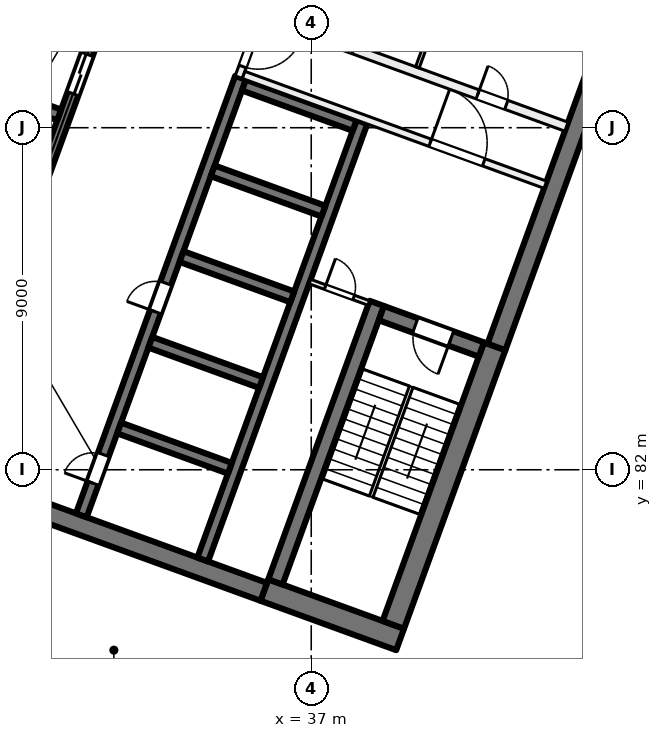
"""IFC4 building model, lengths in metres.
Left out: names, types, materials, properties, quantities, classifications, styles, units other than length and angle.
Written with IfcOpenShell. Run it as: python <this file> out.ifc"""

import sys

from ifc_helpers import new_model, si_unit, direction, frame, frame_2d, origin, place, context, subcontext, project, spatial, rectangle, extrude, element, fill, save


model = new_model("IFC4")
c1 = context("Model", 3, precision=1e-05, world=origin(), true_north=direction((0.0, 1.0)))
c2 = subcontext(c1, "Body", "Model", "MODEL_VIEW")
j1 = project(units=[si_unit("LENGTHUNIT", "METRE"), si_unit("PLANEANGLEUNIT", "RADIAN")], contexts=[c1])
p1 = place(None, origin())
s1 = spatial("IfcSite", under=j1, at=p1, CompositionType="ELEMENT")
p2 = place(p1, origin())
s2 = spatial("IfcBuilding", under=s1, at=p2, CompositionType="ELEMENT")
p3 = place(p2, frame((0.0, 0.0, 232.0)))
s3 = spatial("IfcBuildingStorey", under=s2, at=p3, CompositionType="ELEMENT", Elevation=232.0)
p4 = place(p3, frame((39.338, 77.535, 0.0), z_axis=(0.0, 0.0, 1.0), x_axis=(-0.939701471648, 0.341995824804, 0.0)))
e1 = element("IfcWall", 1, at=p4, inside=s3, PredefinedType="SHEAR", context=c2, shape_type="SweptSolid", body=[
    extrude(rectangle(XDim=3.8, YDim=0.6, at=frame_2d((1.9, 0.0))), origin(), (0.0, 0.0, 1.0), 4.0),
])
p5 = place(p3, frame((35.75, 78.788, 0.0), z_axis=(0.0, 0.0, 1.0), x_axis=(-0.939692894512, 0.342019391267, 0.0)))
e2 = element("IfcWall", 2, at=p5, inside=s3, PredefinedType="SHEAR", context=c2, shape_type="SweptSolid", body=[
    extrude(rectangle(XDim=14.4, YDim=0.5, at=frame_2d((7.2, 0.0))), origin(), (0.0, 0.0, 1.0), 4.0),
])
p6 = place(p3, frame((39.159, 77.92, 0.0), z_axis=(0.0, 0.0, 1.0), x_axis=(0.342016982193, 0.939693771338, 0.0)))
e3 = element("IfcWall", 3, at=p6, inside=s3, PredefinedType="SHEAR", context=c2, shape_type="SweptSolid", body=[
    extrude(rectangle(XDim=7.8, YDim=0.6, at=frame_2d((3.9, 0.0))), origin(), (0.0, 0.0, 1.0), 4.0),
])
p7 = place(p3, frame((41.874, 85.232, 0.0), z_axis=(0.0, 0.0, 1.0), x_axis=(0.342020437038, 0.939692513883, 0.0)))
e4 = element("IfcWall", 4, at=p7, inside=s3, PredefinedType="SHEAR", context=c2, shape_type="SweptSolid", body=[
    extrude(rectangle(XDim=8.975, YDim=0.5, at=frame_2d((4.487, 0.0))), origin(), (0.0, 0.0, 1.0), 4.0),
])
p8 = place(p3, frame((36.058, 79.048, 0.0), z_axis=(0.0, 0.0, 1.0), x_axis=(0.342016982193, 0.939693771338, 0.0)))
e5 = element("IfcWall", 5, at=p8, inside=s3, PredefinedType="SHEAR", context=c2, shape_type="SweptSolid", body=[
    extrude(rectangle(XDim=7.8, YDim=0.4, at=frame_2d((3.9, 0.0))), origin(), (0.0, 0.0, 1.0), 4.0),
])
p9 = place(p3, frame((41.476, 85.164, 0.0), z_axis=(0.0, 0.0, 1.0), x_axis=(-0.939678810556, 0.342058084236, 0.0)))
e6 = element("IfcWall", 6, at=p9, inside=s3, PredefinedType="SHEAR", context=c2, shape_type="SweptSolid", body=[
    extrude(rectangle(XDim=2.8, YDim=0.4, at=frame_2d((1.4, 0.0))), origin(), (0.0, 0.0, 1.0), 4.0),
])
p10 = place(p9, frame((0.85, 0.0, 0.0)))
e7 = element("IfcOpeningElement", 7, at=p10, cuts=e6, PredefinedType="OPENING", context=c2, shape_type="SweptSolid", body=[
    extrude(rectangle(XDim=1.0, YDim=2.1, at=frame_2d((0.5, 1.05))), frame((0.0, 0.21, 0.0), z_axis=(0.0, -1.0, 0.0), x_axis=(1.0, 0.0, 0.0)), (0.0, 0.0, 1.0), 0.42),
])
p11 = place(p3, frame((30.949, 80.801, 0.0), z_axis=(0.0, 0.0, 1.0), x_axis=(0.342016684409, 0.939693879721, 0.0)))
e8 = element("IfcWall", 8, at=p11, inside=s3, PredefinedType="SHEAR", context=c2, shape_type="SweptSolid", body=[
    extrude(rectangle(XDim=12.25, YDim=0.3, at=frame_2d((6.125, 0.0))), origin(), (0.0, 0.0, 1.0), 4.0),
])
p12 = place(p11, frame((0.9, 0.0, 0.0)))
e9 = element("IfcOpeningElement", 9, at=p12, cuts=e8, PredefinedType="OPENING", context=c2, shape_type="SweptSolid", body=[
    extrude(rectangle(XDim=0.8, YDim=2.1, at=frame_2d((0.4, 1.05))), frame((0.0, 0.16, 0.0), z_axis=(0.0, -1.0, 0.0), x_axis=(1.0, 0.0, 0.0)), (0.0, 0.0, 1.0), 0.32),
])
p13 = place(p11, frame((5.7, 0.0, 0.0)))
e10 = element("IfcOpeningElement", 10, at=p13, cuts=e8, PredefinedType="OPENING", context=c2, shape_type="SweptSolid", body=[
    extrude(rectangle(XDim=0.8, YDim=2.1, at=frame_2d((0.4, 1.05))), frame((0.0, 0.16, 0.0), z_axis=(0.0, -1.0, 0.0), x_axis=(1.0, 0.0, 0.0)), (0.0, 0.0, 1.0), 0.32),
])
p14 = place(p3, frame((34.144, 79.638, 0.0), z_axis=(0.0, 0.0, 1.0), x_axis=(0.342016684409, 0.939693879721, 0.0)))
e11 = element("IfcWall", 11, at=p14, inside=s3, PredefinedType="SHEAR", context=c2, shape_type="SweptSolid", body=[
    extrude(rectangle(XDim=12.25, YDim=0.3, at=frame_2d((6.125, 0.0))), origin(), (0.0, 0.0, 1.0), 4.0),
])
p15 = place(p3, frame((34.858, 82.039, 0.0), z_axis=(0.0, 0.0, 1.0), x_axis=(-0.939689908313, 0.342027595692, 0.0)))
e12 = element("IfcWall", 12, at=p15, inside=s3, PredefinedType="SHEAR", context=c2, shape_type="SweptSolid", body=[
    extrude(rectangle(XDim=3.1, YDim=0.3, at=frame_2d((1.55, 0.0))), origin(), (0.0, 0.0, 1.0), 4.0),
])
p16 = place(p3, frame((35.679, 84.294, 0.0), z_axis=(0.0, 0.0, 1.0), x_axis=(-0.939706007505, 0.341983361377, 0.0)))
e13 = element("IfcWall", 13, at=p16, inside=s3, PredefinedType="SHEAR", context=c2, shape_type="SweptSolid", body=[
    extrude(rectangle(XDim=3.1, YDim=0.3, at=frame_2d((1.55, 0.0))), origin(), (0.0, 0.0, 1.0), 4.0),
])
for number, where, z_axis, x_axis in (
    (14, (36.5, 86.549, 0.0), (0.0, 0.0, 1.0), (-0.94, 0.342, 0.0)),
    (15, (37.321, 88.805, 0.0), (0.0, 0.0, 1.0), (-0.94, 0.342, 0.0)),
    (16, (38.142, 91.06, 0.0), (0.0, 0.0, 1.0), (-0.94, 0.342, 0.0)),
):
    element("IfcWall", number, at=place(p3, frame(where, z_axis=z_axis, x_axis=x_axis)), inside=s3, PredefinedType="SHEAR", context=c2, shape_type="SweptSolid", body=[
        extrude(rectangle(XDim=3.1, YDim=0.3, at=frame_2d((1.55, 0.0))), origin(), (0.0, 0.0, 1.0), 4.0),
    ])
p17 = place(p3, frame((27.191, 82.169, 0.0), z_axis=(0.0, 0.0, 1.0), x_axis=(0.342016684409, 0.939693879721, 0.0)))
e17 = element("IfcWall", 17, at=p17, inside=s3, PredefinedType="SHEAR", context=c2, shape_type="SweptSolid", body=[
    extrude(rectangle(XDim=12.25, YDim=0.3, at=frame_2d((6.125, 0.0))), origin(), (0.0, 0.0, 1.0), 4.0),
])
p18 = place(p17, frame((0.75, 0.0, 0.0)))
e18 = element("IfcOpeningElement", 18, at=p18, cuts=e17, PredefinedType="OPENING", context=c2, shape_type="SweptSolid", body=[
    extrude(rectangle(XDim=1.1, YDim=2.1, at=frame_2d((0.55, 1.05))), frame((0.0, 0.16, 0.0), z_axis=(0.0, -1.0, 0.0), x_axis=(1.0, 0.0, 0.0)), (0.0, 0.0, 1.0), 0.32),
])
p19 = place(p17, frame((3.15, 0.0, 0.0)))
e19 = element("IfcOpeningElement", 19, at=p19, cuts=e17, PredefinedType="OPENING", context=c2, shape_type="SweptSolid", body=[
    extrude(rectangle(XDim=1.1, YDim=2.1, at=frame_2d((0.55, 1.05))), frame((0.0, 0.16, 0.0), z_axis=(0.0, -1.0, 0.0), x_axis=(1.0, 0.0, 0.0)), (0.0, 0.0, 1.0), 0.32),
])
p20 = place(p17, frame((5.55, 0.0, 0.0)))
e20 = element("IfcOpeningElement", 20, at=p20, cuts=e17, PredefinedType="OPENING", context=c2, shape_type="SweptSolid", body=[
    extrude(rectangle(XDim=1.1, YDim=2.1, at=frame_2d((0.55, 1.05))), frame((0.0, 0.16, 0.0), z_axis=(0.0, -1.0, 0.0), x_axis=(1.0, 0.0, 0.0)), (0.0, 0.0, 1.0), 0.32),
])
p21 = place(p17, frame((10.35, 0.0, 0.0)))
e21 = element("IfcOpeningElement", 21, at=p21, cuts=e17, PredefinedType="OPENING", context=c2, shape_type="SweptSolid", body=[
    extrude(rectangle(XDim=1.1, YDim=2.1, at=frame_2d((0.55, 1.05))), frame((0.0, 0.16, 0.0), z_axis=(0.0, -1.0, 0.0), x_axis=(1.0, 0.0, 0.0)), (0.0, 0.0, 1.0), 0.32),
])
p22 = place(p3, frame((30.367, 91.336, 0.0), z_axis=(0.0, 0.0, 1.0), x_axis=(-0.939715217871, 0.341958051961, 0.0)))
e22 = element("IfcWall", 22, at=p22, inside=s3, PredefinedType="SHEAR", context=c2, shape_type="SweptSolid", body=[
    extrude(rectangle(XDim=3.1, YDim=0.3, at=frame_2d((1.55, 0.0))), origin(), (0.0, 0.0, 1.0), 4.0),
])
p23 = place(p3, frame((36.443, 96.041, 0.0), z_axis=(0.0, 0.0, 1.0), x_axis=(-0.341996156931, -0.939701350773, 0.0)))
e23 = element("IfcWall", 23, at=p23, inside=s3, PredefinedType="PARTITIONING", context=c2, shape_type="SweptSolid", body=[
    extrude(rectangle(XDim=3.95, YDim=0.2, at=frame_2d((1.975, 0.0))), origin(), (0.0, 0.0, 1.0), 3.625),
])
p24 = place(p23, frame((2.45, 0.0, 0.0)))
e24 = element("IfcOpeningElement", 24, at=p24, cuts=e23, PredefinedType="OPENING", context=c2, shape_type="SweptSolid", body=[
    extrude(rectangle(XDim=1.2, YDim=2.1, at=frame_2d((0.6, 1.05))), frame((0.0, 0.11, 0.0), z_axis=(0.0, -1.0, 0.0), x_axis=(1.0, 0.0, 0.0)), (0.0, 0.0, 1.0), 0.22),
])
p25 = place(p3, frame((35.22, 92.389, 0.0), z_axis=(0.0, 0.0, 1.0), x_axis=(0.939690465531, -0.342026064782, 0.0)))
e25 = element("IfcWall", 25, at=p25, inside=s3, PredefinedType="PARTITIONING", context=c2, shape_type="SweptSolid", body=[
    extrude(rectangle(XDim=8.45, YDim=0.2, at=frame_2d((4.225, 0.0))), origin(), (0.0, 0.0, 1.0), 3.625),
])
p26 = place(p25, frame((5.225, 0.0, 0.0)))
e26 = element("IfcOpeningElement", 26, at=p26, cuts=e25, PredefinedType="OPENING", context=c2, shape_type="SweptSolid", body=[
    extrude(rectangle(XDim=1.5, YDim=2.1, at=frame_2d((0.75, 1.05))), frame((0.0, 0.11, 0.0), z_axis=(0.0, -1.0, 0.0), x_axis=(1.0, 0.0, 0.0)), (0.0, 0.0, 1.0), 0.22),
])
p27 = place(p3, frame((35.776, 93.916, 0.0), z_axis=(0.0, 0.0, 1.0), x_axis=(0.939690465531, -0.342026064782, 0.0)))
e27 = element("IfcWall", 27, at=p27, inside=s3, PredefinedType="PARTITIONING", context=c2, shape_type="SweptSolid", body=[
    extrude(rectangle(XDim=8.45, YDim=0.25, at=frame_2d((4.225, 0.0))), origin(), (0.0, 0.0, 1.0), 3.625),
])
p28 = place(p27, frame((1.69, 0.0, 0.0)))
e28 = element("IfcOpeningElement", 28, at=p28, cuts=e27, PredefinedType="OPENING", context=c2, shape_type="SweptSolid", body=[
    extrude(rectangle(XDim=0.8, YDim=2.1, at=frame_2d((0.4, 1.05))), frame((0.0, 0.135, 0.0), z_axis=(0.0, -1.0, 0.0), x_axis=(1.0, 0.0, 0.0)), (0.0, 0.0, 1.0), 0.27),
])
p29 = place(p27, frame((5.965, 0.0, 0.0)))
e29 = element("IfcOpeningElement", 29, at=p29, cuts=e27, PredefinedType="OPENING", context=c2, shape_type="SweptSolid", body=[
    extrude(rectangle(XDim=0.8, YDim=2.1, at=frame_2d((0.4, 1.05))), frame((0.0, 0.135, 0.0), z_axis=(0.0, -1.0, 0.0), x_axis=(1.0, 0.0, 0.0)), (0.0, 0.0, 1.0), 0.27),
])
p30 = place(p3, frame((36.966, 86.952, 0.0), z_axis=(0.0, 0.0, 1.0), x_axis=(0.939672407396, -0.342075674051, 0.0)))
e30 = element("IfcWall", 30, at=p30, inside=s3, PredefinedType="PARTITIONING", context=c2, shape_type="SweptSolid", body=[
    extrude(rectangle(XDim=1.65, YDim=0.125, at=frame_2d((0.825, 0.0))), origin(), (0.0, 0.0, 1.0), 3.625),
])
p31 = place(p30, frame((0.425, 0.0, 0.0)))
e31 = element("IfcOpeningElement", 31, at=p31, cuts=e30, PredefinedType="OPENING", context=c2, shape_type="SweptSolid", body=[
    extrude(rectangle(XDim=0.8, YDim=2.1, at=frame_2d((0.4, 1.05))), frame((0.0, 0.073, 0.0), z_axis=(0.0, -1.0, 0.0), x_axis=(1.0, 0.0, 0.0)), (0.0, 0.0, 1.0), 0.145),
])
p32 = place(p3, frame((40.512, 94.56, 0.0), z_axis=(0.0, 0.0, 1.0), x_axis=(-0.342023078919, -0.939691552312, 0.0)))
e32 = element("IfcWall", 32, at=p32, inside=s3, PredefinedType="PARTITIONING", context=c2, shape_type="SweptSolid", body=[
    extrude(rectangle(XDim=2.1, YDim=0.1, at=frame_2d((1.05, 0.0))), origin(), (0.0, 0.0, 1.0), 3.625),
])
p33 = place(p21, origin())
e33 = element("IfcDoor", 33, at=p33, inside=s3, OperationType="DOUBLE_DOOR_SLIDING", PredefinedType="DOOR", context=c2, shape_type="SweptSolid", body=[
    extrude(rectangle(XDim=1.1, YDim=2.1, at=frame_2d((0.55, 1.05))), frame((0.0, 0.025, 0.0), z_axis=(0.0, -1.0, 0.0), x_axis=(1.0, 0.0, 0.0)), (0.0, 0.0, 1.0), 0.05),
])
fill(e21, e33)
p34 = place(p12, origin())
e34 = element("IfcDoor", 34, at=p34, inside=s3, OperationType="SINGLE_SWING_LEFT", PredefinedType="DOOR", context=c2, shape_type="SweptSolid", body=[
    extrude(rectangle(XDim=0.8, YDim=2.1, at=frame_2d((0.4, 1.05))), frame((0.0, 0.025, 0.0), z_axis=(0.0, -1.0, 0.0), x_axis=(1.0, 0.0, 0.0)), (0.0, 0.0, 1.0), 0.05),
])
fill(e9, e34)
p35 = place(p13, origin())
e35 = element("IfcDoor", 35, at=p35, inside=s3, OperationType="SINGLE_SWING_RIGHT", PredefinedType="DOOR", context=c2, shape_type="SweptSolid", body=[
    extrude(rectangle(XDim=0.8, YDim=2.1, at=frame_2d((0.4, 1.05))), frame((0.0, 0.025, 0.0), z_axis=(0.0, -1.0, 0.0), x_axis=(1.0, 0.0, 0.0)), (0.0, 0.0, 1.0), 0.05),
])
fill(e10, e35)
p36 = place(p24, origin())
e36 = element("IfcDoor", 36, at=p36, inside=s3, OperationType="DOUBLE_DOOR_SINGLE_SWING", PredefinedType="DOOR", context=c2, shape_type="SweptSolid", body=[
    extrude(rectangle(XDim=1.2, YDim=2.1, at=frame_2d((0.6, 1.05))), frame((0.0, 0.025, 0.0), z_axis=(0.0, -1.0, 0.0), x_axis=(1.0, 0.0, 0.0)), (0.0, 0.0, 1.0), 0.05),
])
fill(e24, e36)
p37 = place(p26, origin())
e37 = element("IfcDoor", 37, at=p37, inside=s3, OperationType="DOUBLE_DOOR_SINGLE_SWING", PredefinedType="DOOR", context=c2, shape_type="SweptSolid", body=[
    extrude(rectangle(XDim=1.5, YDim=2.1, at=frame_2d((0.75, 1.05))), frame((0.0, 0.025, 0.0), z_axis=(0.0, -1.0, 0.0), x_axis=(1.0, 0.0, 0.0)), (0.0, 0.0, 1.0), 0.05),
])
fill(e26, e37)
p38 = place(p10, origin())
e38 = element("IfcDoor", 38, at=p38, inside=s3, OperationType="SINGLE_SWING_RIGHT", PredefinedType="DOOR", context=c2, shape_type="SweptSolid", body=[
    extrude(rectangle(XDim=1.0, YDim=2.1, at=frame_2d((0.5, 1.05))), frame((0.0, 0.025, 0.0), z_axis=(0.0, -1.0, 0.0), x_axis=(1.0, 0.0, 0.0)), (0.0, 0.0, 1.0), 0.05),
])
fill(e7, e38)
p39 = place(p31, origin())
e39 = element("IfcDoor", 39, at=p39, inside=s3, OperationType="SINGLE_SWING_LEFT", PredefinedType="DOOR", context=c2, shape_type="SweptSolid", body=[
    extrude(rectangle(XDim=0.8, YDim=2.1, at=frame_2d((0.4, 1.05))), frame((0.0, 0.025, 0.0), z_axis=(0.0, -1.0, 0.0), x_axis=(1.0, 0.0, 0.0)), (0.0, 0.0, 1.0), 0.05),
])
fill(e31, e39)
p40 = place(p29, origin())
e40 = element("IfcDoor", 40, at=p40, inside=s3, OperationType="SINGLE_SWING_LEFT", PredefinedType="DOOR", context=c2, shape_type="SweptSolid", body=[
    extrude(rectangle(XDim=0.8, YDim=2.1, at=frame_2d((0.4, 1.05))), frame((0.0, 0.025, 0.0), z_axis=(0.0, -1.0, 0.0), x_axis=(1.0, 0.0, 0.0)), (0.0, 0.0, 1.0), 0.05),
])
fill(e29, e40)
save(model, sys.argv[1])
